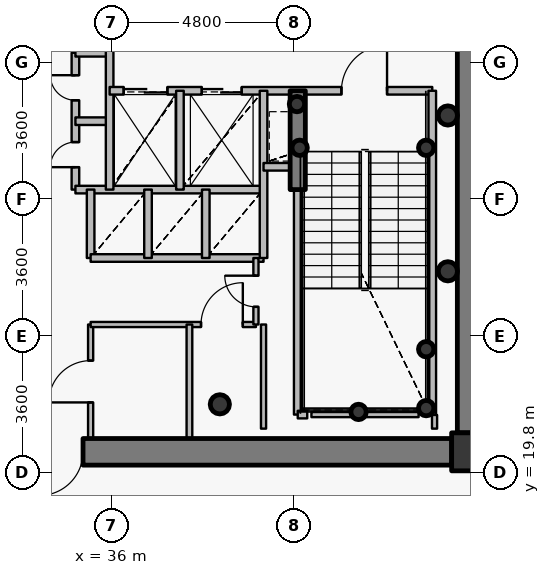
"""IFC4 building model, lengths in metres.
Left out: names, types, materials, properties, quantities, classifications, styles, units other than length and angle.
Written with IfcOpenShell. Run it as: python <this file> out.ifc"""

import sys

from ifc_helpers import new_model, si_unit, direction, frame, frame_2d, origin, origin_2d, place, context, subcontext, project, spatial, rectangle, hollow_circle, extrude, source, transform, mapped, element, fill, save


model = new_model("IFC4")
c1 = context("Model", 3, precision=1e-05, world=origin(), true_north=direction((0.0, 1.0)))
c2 = subcontext(c1, "Body", "Model", "MODEL_VIEW")
j1 = project(units=[si_unit("LENGTHUNIT", "METRE"), si_unit("PLANEANGLEUNIT", "RADIAN")], contexts=[c1])
p1 = place(None, origin())
s1 = spatial("IfcSite", under=j1, at=p1, CompositionType="ELEMENT")
p2 = place(p1, origin())
s2 = spatial("IfcBuilding", under=s1, at=p2, CompositionType="ELEMENT")
p3 = place(p2, frame((0.0, 0.0, 229.05)))
s3 = spatial("IfcBuildingStorey", under=s2, at=p3, CompositionType="ELEMENT", Elevation=229.05)
p4 = place(p3, frame((45.45, 20.35, 0.0), z_axis=(0.0, 0.0, 1.0), x_axis=(1.0, 0.0, 0.0)))
e1 = element("IfcColumn", 1, at=p4, inside=s3, PredefinedType="COLUMN", context=c2, shape_type="SweptSolid", body=[
    extrude(rectangle(XDim=1.0, YDim=1.0, at=origin_2d()), origin(), (0.0, 0.0, 1.0), 3.75),
])
p5 = place(p3, frame((38.85, 21.6, 0.0), z_axis=(0.0, 0.0, 1.0), x_axis=(1.0, 0.0, 0.0)))
e2 = element("IfcColumn", 2, at=p5, inside=s3, PredefinedType="COLUMN", context=c2, shape_type="SweptSolid", body=[
    extrude(hollow_circle(Radius=0.254, WallThickness=0.02, at=origin_2d()), origin(), (0.0, 0.0, 1.0), 3.75),
])
for number, where, z_axis, x_axis in (
    (3, (44.28, 21.5, 0.0), (0.0, 0.0, 1.0), (1.0, 0.0, 0.0)),
    (4, (44.28, 23.05, 0.0), (0.0, 0.0, 1.0), (1.0, 0.0, 0.0)),
    (5, (42.5, 21.4, 0.0), (0.0, 0.0, 1.0), (1.0, 0.0, 0.0)),
    (6, (40.95, 28.35, 0.0), (0.0, 0.0, 1.0), (1.0, 0.0, 0.0)),
    (7, (44.28, 28.35, 0.0), (0.0, 0.0, 1.0), (1.0, 0.0, 0.0)),
    (8, (40.88, 29.5, 0.0), (0.0, 0.0, 1.0), (1.0, 0.0, 0.0)),
):
    element("IfcColumn", number, at=place(p3, frame(where, z_axis=z_axis, x_axis=x_axis)), inside=s3, PredefinedType="COLUMN", context=c2, shape_type="SweptSolid", body=[
        extrude(hollow_circle(Radius=0.203, WallThickness=0.016, at=origin_2d()), origin(), (0.0, 0.0, 1.0), 3.75),
    ])
p6 = place(p3, frame((45.45, 33.15, 0.0), z_axis=(0.0, 0.0, 1.0), x_axis=(0.0, -1.0, 0.0)))
e9 = element("IfcWall", 9, at=p6, inside=s3, PredefinedType="SHEAR", context=c2, shape_type="SweptSolid", body=[
    extrude(rectangle(XDim=12.3, YDim=0.7, at=frame_2d((6.15, 0.0))), origin(), (0.0, 0.0, 1.0), 3.05),
])
p7 = place(p3, frame((44.95, 20.35, 0.0), z_axis=(0.0, 0.0, 1.0), x_axis=(-1.0, 0.0, 0.0)))
e10 = element("IfcWall", 10, at=p7, inside=s3, PredefinedType="SHEAR", context=c2, shape_type="SweptSolid", body=[
    extrude(rectangle(XDim=17.9, YDim=0.7, at=frame_2d((8.95, 0.0))), origin(), (0.0, 0.0, 1.0), 3.05),
])
p8 = place(p7, frame((9.7, 0.0, 0.0)))
e11 = element("IfcOpeningElement", 11, at=p8, cuts=e10, PredefinedType="OPENING", context=c2, shape_type="SweptSolid", body=[
    extrude(rectangle(XDim=1.15, YDim=2.15, at=origin_2d()), frame((0.575, 0.36, 1.075), z_axis=(0.0, -1.0, 0.0), x_axis=(1.0, 0.0, 0.0)), (0.0, 0.0, 1.0), 0.72),
])
p9 = place(p3, frame((40.9, 27.25, 0.0), z_axis=(0.0, 0.0, 1.0), x_axis=(0.0, 1.0, 0.0)))
e12 = element("IfcWall", 12, at=p9, inside=s3, PredefinedType="SHEAR", context=c2, shape_type="SweptSolid", body=[
    extrude(rectangle(XDim=2.6, YDim=0.4, at=frame_2d((1.3, 0.0))), origin(), (0.0, 0.0, 1.0), 3.1),
])
for number, where, z_axis, x_axis in (
    (13, (44.85, 25.1, 0.0), (0.0, 0.0, 1.0), (1.0, 0.0, 0.0)),
    (14, (44.85, 29.2, 0.0), (0.0, 0.0, 1.0), (1.0, 0.0, 0.0)),
):
    element("IfcColumn", number, at=place(p3, frame(where, z_axis=z_axis, x_axis=x_axis)), inside=s3, PredefinedType="COLUMN", context=c2, shape_type="SweptSolid", body=[
        extrude(hollow_circle(Radius=0.254, WallThickness=0.02, at=origin_2d()), origin(), (0.0, 0.0, 1.0), 3.75),
    ])
p10 = place(p3, frame((35.05, 27.25, 0.0), z_axis=(0.0, 0.0, 1.0), x_axis=(0.0, 1.0, 0.0)))
e15 = element("IfcWall", 15, at=p10, inside=s3, PredefinedType="PARTITIONING", context=c2, shape_type="SweptSolid", body=[
    extrude(rectangle(XDim=3.6, YDim=0.2, at=frame_2d((1.8, 0.0))), origin(), (0.0, 0.0, 1.0), 3.5),
])
p11 = place(p10, frame((0.59, 0.0, 0.0)))
e16 = element("IfcOpeningElement", 16, at=p11, cuts=e15, PredefinedType="OPENING", context=c2, shape_type="SweptSolid", body=[
    extrude(rectangle(XDim=0.66, YDim=2.05, at=origin_2d()), frame((0.33, 0.11, 1.025), z_axis=(0.0, -1.0, 0.0), x_axis=(1.0, 0.0, 0.0)), (0.0, 0.0, 1.0), 0.22),
])
p12 = place(p10, frame((2.35, 0.0, 0.0)))
e17 = element("IfcOpeningElement", 17, at=p12, cuts=e15, PredefinedType="OPENING", context=c2, shape_type="SweptSolid", body=[
    extrude(rectangle(XDim=0.66, YDim=2.05, at=origin_2d()), frame((0.33, 0.11, 1.025), z_axis=(0.0, -1.0, 0.0), x_axis=(1.0, 0.0, 0.0)), (0.0, 0.0, 1.0), 0.22),
])
p13 = place(p3, frame((35.05, 27.25, 0.0), z_axis=(0.0, 0.0, 1.0), x_axis=(1.0, 0.0, 0.0)))
e18 = element("IfcWall", 18, at=p13, inside=s3, PredefinedType="PARTITIONING", context=c2, shape_type="SweptSolid", body=[
    extrude(rectangle(XDim=4.95, YDim=0.2, at=frame_2d((2.475, 0.0))), origin(), (0.0, 0.0, 1.0), 3.085),
])
for number, where, z_axis, x_axis in (
    (19, (35.05, 29.05, 0.0), (0.0, 0.0, 1.0), (1.0, 0.0, 0.0)),
    (20, (35.05, 30.85, 0.0), (0.0, 0.0, 1.0), (1.0, 0.0, 0.0)),
):
    element("IfcWall", number, at=place(p3, frame(where, z_axis=z_axis, x_axis=x_axis)), inside=s3, PredefinedType="PARTITIONING", context=c2, shape_type="SweptSolid", body=[
        extrude(rectangle(XDim=0.9, YDim=0.2, at=frame_2d((0.45, 0.0))), origin(), (0.0, 0.0, 1.0), 3.5),
    ])
p14 = place(p3, frame((35.45, 20.7, 0.0), z_axis=(0.0, 0.0, 1.0), x_axis=(0.0, 1.0, 0.0)))
e21 = element("IfcWall", 21, at=p14, inside=s3, PredefinedType="PARTITIONING", context=c2, shape_type="SweptSolid", body=[
    extrude(rectangle(XDim=3.0, YDim=0.135, at=frame_2d((1.5, 0.0))), origin(), (0.0, 0.0, 1.0), 3.085),
])
p15 = place(p14, frame((0.95, 0.0, 0.0)))
e22 = element("IfcOpeningElement", 22, at=p15, cuts=e21, PredefinedType="OPENING", context=c2, shape_type="SweptSolid", body=[
    extrude(rectangle(XDim=1.1, YDim=2.15, at=origin_2d()), frame((0.55, 0.078, 1.075), z_axis=(0.0, -1.0, 0.0), x_axis=(1.0, 0.0, 0.0)), (0.0, 0.0, 1.0), 0.155),
])
p16 = place(p3, frame((35.45, 23.7, 0.0), z_axis=(0.0, 0.0, 1.0), x_axis=(1.0, 0.0, 0.0)))
e23 = element("IfcWall", 23, at=p16, inside=s3, PredefinedType="PARTITIONING", context=c2, shape_type="SweptSolid", body=[
    extrude(rectangle(XDim=4.35, YDim=0.135, at=frame_2d((2.175, 0.0))), origin(), (0.0, 0.0, 1.0), 3.085),
])
p17 = place(p16, frame((2.905, 0.0, 0.0)))
e24 = element("IfcOpeningElement", 24, at=p17, cuts=e23, PredefinedType="OPENING", context=c2, shape_type="SweptSolid", body=[
    extrude(rectangle(XDim=1.1, YDim=2.15, at=origin_2d()), frame((0.55, 0.078, 1.075), z_axis=(0.0, -1.0, 0.0), x_axis=(1.0, 0.0, 0.0)), (0.0, 0.0, 1.0), 0.155),
])
p18 = place(p3, frame((35.45, 25.45, 0.0), z_axis=(0.0, 0.0, 1.0), x_axis=(0.0, 1.0, 0.0)))
e25 = element("IfcWall", 25, at=p18, inside=s3, PredefinedType="PARTITIONING", context=c2, shape_type="SweptSolid", body=[
    extrude(rectangle(XDim=1.8, YDim=0.2, at=frame_2d((0.9, 0.0))), origin(), (0.0, 0.0, 1.0), 3.5),
])
p19 = place(p3, frame((35.45, 25.45, 0.0), z_axis=(0.0, 0.0, 1.0), x_axis=(1.0, 0.0, 0.0)))
e26 = element("IfcWall", 26, at=p19, inside=s3, PredefinedType="PARTITIONING", context=c2, shape_type="SweptSolid", body=[
    extrude(rectangle(XDim=4.55, YDim=0.2, at=frame_2d((2.275, 0.0))), origin(), (0.0, 0.0, 1.0), 3.085),
])
p20 = place(p3, frame((35.95, 27.25, 0.0), z_axis=(0.0, 0.0, 1.0), x_axis=(0.0, 1.0, 0.0)))
e27 = element("IfcWall", 27, at=p20, inside=s3, PredefinedType="PARTITIONING", context=c2, shape_type="SweptSolid", body=[
    extrude(rectangle(XDim=3.8, YDim=0.2, at=frame_2d((1.9, 0.0))), origin(), (0.0, 0.0, 1.0), 3.5),
])
p21 = place(p3, frame((35.95, 29.85, 0.0), z_axis=(0.0, 0.0, 1.0), x_axis=(1.0, 0.0, 0.0)))
e28 = element("IfcWall", 28, at=p21, inside=s3, PredefinedType="PARTITIONING", context=c2, shape_type="SweptSolid", body=[
    extrude(rectangle(XDim=8.49, YDim=0.2, at=frame_2d((4.245, 0.0))), origin(), (0.0, 0.0, 1.0), 3.085),
])
p22 = place(p21, frame((6.1, 0.0, 0.0)))
e29 = element("IfcOpeningElement", 29, at=p22, cuts=e28, PredefinedType="OPENING", context=c2, shape_type="SweptSolid", body=[
    extrude(rectangle(XDim=1.2, YDim=2.15, at=origin_2d()), frame((0.6, 0.11, 1.075), z_axis=(0.0, -1.0, 0.0), x_axis=(1.0, 0.0, 0.0)), (0.0, 0.0, 1.0), 0.22),
])
p23 = place(p21, frame((0.37, 0.0, 0.0)))
e30 = element("IfcOpeningElement", 30, at=p23, cuts=e28, PredefinedType="OPENING", context=c2, shape_type="SweptSolid", body=[
    extrude(rectangle(XDim=1.15, YDim=2.15, at=origin_2d()), frame((0.575, 0.11, 1.075), z_axis=(0.0, -1.0, 0.0), x_axis=(1.0, 0.0, 0.0)), (0.0, 0.0, 1.0), 0.22),
])
p24 = place(p21, frame((2.425, 0.0, 0.0)))
e31 = element("IfcOpeningElement", 31, at=p24, cuts=e28, PredefinedType="OPENING", context=c2, shape_type="SweptSolid", body=[
    extrude(rectangle(XDim=1.05, YDim=2.15, at=origin_2d()), frame((0.525, 0.11, 1.075), z_axis=(0.0, -1.0, 0.0), x_axis=(1.0, 0.0, 0.0)), (0.0, 0.0, 1.0), 0.22),
])
p25 = place(p3, frame((36.96, 25.45, 0.0), z_axis=(0.0, 0.0, 1.0), x_axis=(0.0, 1.0, 0.0)))
e32 = element("IfcWall", 32, at=p25, inside=s3, PredefinedType="PARTITIONING", context=c2, shape_type="SweptSolid", body=[
    extrude(rectangle(XDim=1.8, YDim=0.2, at=frame_2d((0.9, 0.0))), origin(), (0.0, 0.0, 1.0), 3.5),
])
p26 = place(p3, frame((37.8, 27.25, 0.0), z_axis=(0.0, 0.0, 1.0), x_axis=(0.0, 1.0, 0.0)))
e33 = element("IfcWall", 33, at=p26, inside=s3, PredefinedType="PARTITIONING", context=c2, shape_type="SweptSolid", body=[
    extrude(rectangle(XDim=2.6, YDim=0.2, at=frame_2d((1.3, 0.0))), origin(), (0.0, 0.0, 1.0), 3.5),
])
p27 = place(p3, frame((38.05, 20.18, 0.0), z_axis=(0.0, 0.0, 1.0), x_axis=(0.0, 1.0, 0.0)))
e34 = element("IfcWall", 34, at=p27, inside=s3, PredefinedType="PARTITIONING", context=c2, shape_type="SweptSolid", body=[
    extrude(rectangle(XDim=3.52, YDim=0.15, at=frame_2d((1.76, 0.0))), origin(), (0.0, 0.0, 1.0), 3.035),
])
p28 = place(p3, frame((38.48, 25.45, 0.0), z_axis=(0.0, 0.0, 1.0), x_axis=(0.0, 1.0, 0.0)))
e35 = element("IfcWall", 35, at=p28, inside=s3, PredefinedType="PARTITIONING", context=c2, shape_type="SweptSolid", body=[
    extrude(rectangle(XDim=1.8, YDim=0.2, at=frame_2d((0.9, 0.0))), origin(), (0.0, 0.0, 1.0), 3.5),
])
p29 = place(p3, frame((39.8, 23.7, 0.0), z_axis=(0.0, 0.0, 1.0), x_axis=(0.0, 1.0, 0.0)))
e36 = element("IfcWall", 36, at=p29, inside=s3, PredefinedType="PARTITIONING", context=c2, shape_type="SweptSolid", body=[
    extrude(rectangle(XDim=1.75, YDim=0.135, at=frame_2d((0.875, 0.0))), origin(), (0.0, 0.0, 1.0), 3.5),
])
p30 = place(p29, frame((0.465, 0.0, 0.0)))
e37 = element("IfcOpeningElement", 37, at=p30, cuts=e36, PredefinedType="OPENING", context=c2, shape_type="SweptSolid", body=[
    extrude(rectangle(XDim=0.82, YDim=2.1, at=origin_2d()), frame((0.41, 0.078, 1.05), z_axis=(0.0, -1.0, 0.0), x_axis=(1.0, 0.0, 0.0)), (0.0, 0.0, 1.0), 0.155),
])
p31 = place(p3, frame((40.0, 25.45, 0.0), z_axis=(0.0, 0.0, 1.0), x_axis=(0.0, 1.0, 0.0)))
e38 = element("IfcWall", 38, at=p31, inside=s3, PredefinedType="PARTITIONING", context=c2, shape_type="SweptSolid", body=[
    extrude(rectangle(XDim=4.4, YDim=0.2, at=frame_2d((2.2, 0.0))), origin(), (0.0, 0.0, 1.0), 3.5),
])
p32 = place(p3, frame((40.0, 27.85, 0.0), z_axis=(0.0, 0.0, 1.0), x_axis=(1.0, 0.0, 0.0)))
e39 = element("IfcWall", 39, at=p32, inside=s3, PredefinedType="PARTITIONING", context=c2, shape_type="SweptSolid", body=[
    extrude(rectangle(XDim=0.9, YDim=0.2, at=frame_2d((0.45, 0.0))), origin(), (0.0, 0.0, 1.0), 3.5),
])
p33 = place(p3, frame((40.9, 21.33, 0.0), z_axis=(0.0, 0.0, 1.0), x_axis=(0.0, 1.0, 0.0)))
e40 = element("IfcWall", 40, at=p33, inside=s3, PredefinedType="PARTITIONING", context=c2, shape_type="SweptSolid", body=[
    extrude(rectangle(XDim=5.91, YDim=0.2, at=frame_2d((2.955, 0.0))), origin(), (0.0, 0.0, 1.0), 3.035),
])
p34 = place(p3, frame((40.9, 21.33, 0.0), z_axis=(0.0, 0.0, 1.0), x_axis=(1.0, 0.0, 0.0)))
e41 = element("IfcWall", 41, at=p34, inside=s3, PredefinedType="PARTITIONING", context=c2, shape_type="SweptSolid", body=[
    extrude(rectangle(XDim=0.25, YDim=0.2, at=frame_2d((0.125, 0.0))), origin(), (0.0, 0.0, 1.0), 3.035),
])
p35 = place(p3, frame((44.44, 21.33, 0.0), z_axis=(0.0, 0.0, 1.0), x_axis=(0.0, 1.0, 0.0)))
e42 = element("IfcWall", 42, at=p35, inside=s3, PredefinedType="PARTITIONING", context=c2, shape_type="SweptSolid", body=[
    extrude(rectangle(XDim=8.52, YDim=0.2, at=frame_2d((4.26, 0.0))), origin(), (0.0, 0.0, 1.0), 3.5),
])
p36 = place(p3, frame((44.08, 21.33, 0.0), z_axis=(0.0, 0.0, 1.0), x_axis=(-1.0, 0.0, 0.0)))
e43 = element("IfcWall", 43, at=p36, inside=s3, PredefinedType="PARTITIONING", context=c2, shape_type="SweptSolid", body=[
    extrude(rectangle(XDim=2.82, YDim=0.135, at=frame_2d((1.41, 0.0))), origin(), (0.0, 0.0, 1.0), 3.035),
])
p37 = place(p3, frame((40.0, 23.7, 0.0), z_axis=(0.0, 0.0, 1.0), x_axis=(0.0, -1.0, 0.0)))
e44 = element("IfcWall", 44, at=p37, inside=s3, PredefinedType="PARTITIONING", context=c2, shape_type="SweptSolid", body=[
    extrude(rectangle(XDim=2.74, YDim=0.135, at=frame_2d((1.37, 0.0))), origin(), (0.0, 0.0, 1.0), 3.035),
])
p38 = place(p3, frame((44.5, 20.96, 0.0), z_axis=(0.0, 0.0, 1.0), x_axis=(0.0, 1.0, 0.0)))
e45 = element("IfcWall", 45, at=p38, inside=s3, PredefinedType="PARTITIONING", context=c2, shape_type="SweptSolid", body=[
    extrude(rectangle(XDim=0.36, YDim=0.135, at=frame_2d((0.18, 0.0))), origin(), (0.0, 0.0, 1.0), 3.5),
])
p39 = place(p3, frame((44.96, 20.0, 0.0), z_axis=(0.0, 0.0, 1.0), x_axis=(1.0, 0.0, 0.0)))
e46 = element("IfcWall", 46, at=p39, inside=s3, PredefinedType="PARTITIONING", context=c2, shape_type="SweptSolid", body=[
    extrude(rectangle(XDim=0.83, YDim=0.135, at=frame_2d((0.415, 0.0))), origin(), (0.0, 0.0, 1.0), 2.935),
])
m1 = source(origin(), c2, "Body", "SweptSolid", [
    extrude(rectangle(XDim=1.15, YDim=2.15, at=origin_2d()), frame((0.575, 0.025, 1.075), z_axis=(0.0, -1.0, 0.0), x_axis=(1.0, 0.0, 0.0)), (0.0, 0.0, 1.0), 0.05),
])
p40 = place(p8, origin())
e47 = element("IfcDoor", 47, at=p40, inside=s3, OperationType="SINGLE_SWING_RIGHT", PredefinedType="DOOR", context=c2, shape_type="MappedRepresentation", body=[
    mapped(m1, transform((0.0, 0.0, 0.0), x_axis=(1.0, 0.0, 0.0), y_axis=(0.0, 1.0, 0.0), z_axis=(0.0, 0.0, 1.0), scale=1.0)),
])
fill(e11, e47)
m2 = source(origin(), c2, "Body", "SweptSolid", [
    extrude(rectangle(XDim=1.2, YDim=2.15, at=origin_2d()), frame((0.6, 0.025, 1.075), z_axis=(0.0, -1.0, 0.0), x_axis=(1.0, 0.0, 0.0)), (0.0, 0.0, 1.0), 0.05),
])
p41 = place(p22, origin())
e48 = element("IfcDoor", 48, at=p41, inside=s3, OperationType="SINGLE_SWING_RIGHT", PredefinedType="DOOR", context=c2, shape_type="MappedRepresentation", body=[
    mapped(m2, transform((0.0, 0.0, 0.0), x_axis=(1.0, 0.0, 0.0), y_axis=(0.0, 1.0, 0.0), z_axis=(0.0, 0.0, 1.0), scale=1.0)),
])
fill(e29, e48)
m3 = source(origin(), c2, "Body", "SweptSolid", [
    extrude(rectangle(XDim=1.15, YDim=2.15, at=origin_2d()), frame((0.575, 0.025, 1.075), z_axis=(0.0, -1.0, 0.0), x_axis=(1.0, 0.0, 0.0)), (0.0, 0.0, 1.0), 0.05),
])
p42 = place(p23, origin())
e49 = element("IfcDoor", 49, at=p42, inside=s3, OperationType="DOUBLE_DOOR_SLIDING", PredefinedType="USERDEFINED", context=c2, shape_type="MappedRepresentation", body=[
    mapped(m3, transform((0.0, 0.0, 0.0), x_axis=(1.0, 0.0, 0.0), y_axis=(0.0, 1.0, 0.0), z_axis=(0.0, 0.0, 1.0), scale=1.0)),
])
fill(e30, e49)
m4 = source(origin(), c2, "Body", "SweptSolid", [
    extrude(rectangle(XDim=1.05, YDim=2.15, at=origin_2d()), frame((0.525, 0.025, 1.075), z_axis=(0.0, -1.0, 0.0), x_axis=(1.0, 0.0, 0.0)), (0.0, 0.0, 1.0), 0.05),
])
p43 = place(p24, origin())
e50 = element("IfcDoor", 50, at=p43, inside=s3, OperationType="DOUBLE_DOOR_SLIDING", PredefinedType="USERDEFINED", context=c2, shape_type="MappedRepresentation", body=[
    mapped(m4, transform((0.0, 0.0, 0.0), x_axis=(1.0, 0.0, 0.0), y_axis=(0.0, 1.0, 0.0), z_axis=(0.0, 0.0, 1.0), scale=1.0)),
])
fill(e31, e50)
m5 = source(origin(), c2, "Body", "SweptSolid", [
    extrude(rectangle(XDim=0.66, YDim=2.05, at=origin_2d()), frame((0.33, 0.025, 1.025), z_axis=(0.0, -1.0, 0.0), x_axis=(1.0, 0.0, 0.0)), (0.0, 0.0, 1.0), 0.05),
])
p44 = place(p11, origin())
e51 = element("IfcDoor", 51, at=p44, inside=s3, OperationType="SINGLE_SWING_LEFT", PredefinedType="USERDEFINED", context=c2, shape_type="MappedRepresentation", body=[
    mapped(m5, transform((0.0, 0.0, 0.0), x_axis=(1.0, 0.0, 0.0), y_axis=(0.0, 1.0, 0.0), z_axis=(0.0, 0.0, 1.0), scale=1.0)),
])
fill(e16, e51)
p45 = place(p12, origin())
e52 = element("IfcDoor", 52, at=p45, inside=s3, OperationType="SINGLE_SWING_RIGHT", PredefinedType="USERDEFINED", context=c2, shape_type="MappedRepresentation", body=[
    mapped(m5, transform((0.0, 0.0, 0.0), x_axis=(1.0, 0.0, 0.0), y_axis=(0.0, 1.0, 0.0), z_axis=(0.0, 0.0, 1.0), scale=1.0)),
])
fill(e17, e52)
m6 = source(origin(), c2, "Body", "SweptSolid", [
    extrude(rectangle(XDim=1.1, YDim=2.15, at=origin_2d()), frame((0.55, 0.025, 1.075), z_axis=(0.0, -1.0, 0.0), x_axis=(1.0, 0.0, 0.0)), (0.0, 0.0, 1.0), 0.05),
])
p46 = place(p15, origin())
e53 = element("IfcDoor", 53, at=p46, inside=s3, OperationType="SINGLE_SWING_LEFT", PredefinedType="DOOR", context=c2, shape_type="MappedRepresentation", body=[
    mapped(m6, transform((0.0, 0.0, 0.0), x_axis=(1.0, 0.0, 0.0), y_axis=(0.0, 1.0, 0.0), z_axis=(0.0, 0.0, 1.0), scale=1.0)),
])
fill(e22, e53)
p47 = place(p17, origin())
e54 = element("IfcDoor", 54, at=p47, inside=s3, OperationType="SINGLE_SWING_RIGHT", PredefinedType="DOOR", context=c2, shape_type="MappedRepresentation", body=[
    mapped(m6, transform((0.0, 0.0, 0.0), x_axis=(1.0, 0.0, 0.0), y_axis=(0.0, 1.0, 0.0), z_axis=(0.0, 0.0, 1.0), scale=1.0)),
])
fill(e24, e54)
m7 = source(origin(), c2, "Body", "SweptSolid", [
    extrude(rectangle(XDim=0.82, YDim=2.1, at=origin_2d()), frame((0.41, 0.025, 1.05), z_axis=(0.0, -1.0, 0.0), x_axis=(1.0, 0.0, 0.0)), (0.0, 0.0, 1.0), 0.05),
])
p48 = place(p30, origin())
e55 = element("IfcDoor", 55, at=p48, inside=s3, OperationType="SINGLE_SWING_RIGHT", PredefinedType="DOOR", context=c2, shape_type="MappedRepresentation", body=[
    mapped(m7, transform((0.0, 0.0, 0.0), x_axis=(1.0, 0.0, 0.0), y_axis=(0.0, 1.0, 0.0), z_axis=(0.0, 0.0, 1.0), scale=1.0)),
])
fill(e37, e55)
save(model, sys.argv[1])
